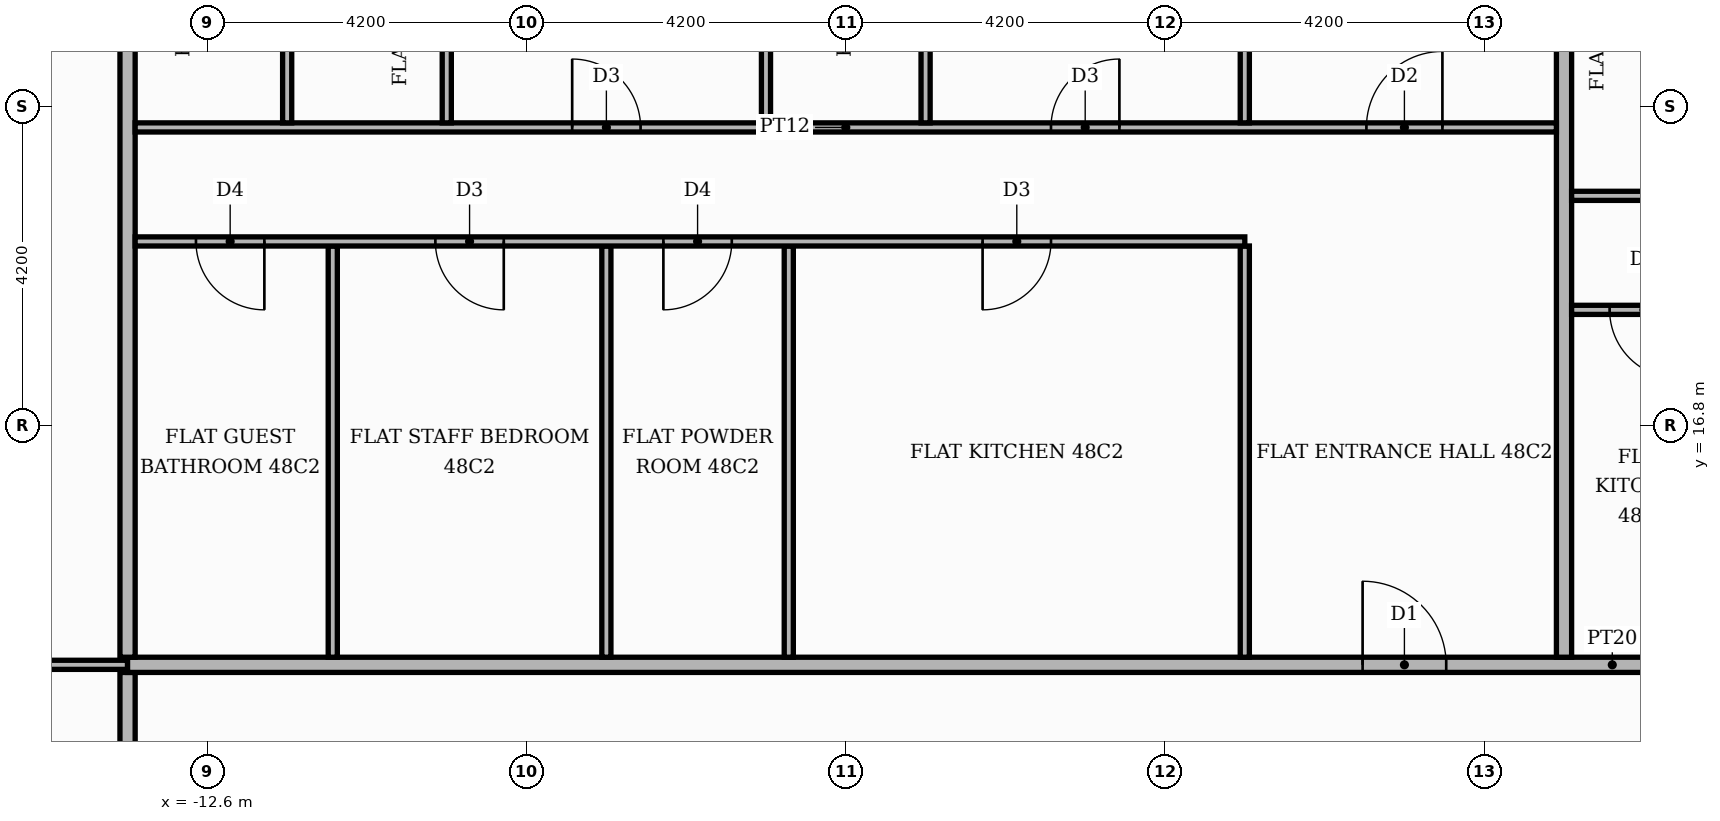
"""IFC4 building model, lengths in metres.
Left out: names, types, materials, properties, quantities, classifications, styles, units other than length and angle.
Written with IfcOpenShell. Run it as: python <this file> out.ifc"""

import sys

from ifc_helpers import new_model, si_unit, direction, frame, frame_2d, origin, place, context, subcontext, project, spatial, rectangle, extrude, element, fill, save


model = new_model("IFC4")
c1 = context("Model", 3, precision=1e-05, world=origin(), true_north=direction((0.0, 1.0)))
c2 = subcontext(c1, "Body", "Model", "MODEL_VIEW")
j1 = project(units=[si_unit("LENGTHUNIT", "METRE"), si_unit("PLANEANGLEUNIT", "RADIAN")], contexts=[c1])
p1 = place(None, origin())
s1 = spatial("IfcSite", under=j1, at=p1, CompositionType="ELEMENT")
p2 = place(p1, origin())
s2 = spatial("IfcBuilding", under=s1, at=p2, CompositionType="ELEMENT")
p3 = place(p2, frame((0.0, 0.0, 204.0)))
s3 = spatial("IfcBuildingStorey", under=s2, at=p3, CompositionType="ELEMENT", Elevation=204.0)
p4 = place(p3, frame((-13.65, -13.55, 0.0), z_axis=(0.0, 0.0, 1.0), x_axis=(0.0, 1.0, 0.0)))
e1 = element("IfcWall", 1, at=p4, inside=s3, PredefinedType="PARTITIONING", context=c2, shape_type="SweptSolid", body=[
    extrude(rectangle(XDim=27.1, YDim=0.2, at=frame_2d((13.55, 0.0))), origin(), (0.0, 0.0, 1.0), 3.48),
])
p5 = place(p4, frame((23.5, 0.0, 0.0)))
e2 = element("IfcOpeningElement", 2, at=p5, cuts=e1, PredefinedType="OPENING", context=c2, shape_type="SweptSolid", body=[
    extrude(rectangle(XDim=1.1, YDim=2.4, at=frame_2d((0.55, 1.2))), frame((0.0, 0.11, 0.0), z_axis=(0.0, -1.0, 0.0), x_axis=(1.0, 0.0, 0.0)), (0.0, 0.0, 1.0), 0.22),
])
p6 = place(p3, frame((-19.82, 13.65, 0.0), z_axis=(0.0, 0.0, 1.0), x_axis=(1.0, 0.0, 0.0)))
e3 = element("IfcWall", 3, at=p6, inside=s3, PredefinedType="PARTITIONING", context=c2, shape_type="SweptSolid", body=[
    extrude(rectangle(XDim=6.17, YDim=0.12, at=frame_2d((3.085, 0.0))), origin(), (0.0, 0.0, 1.0), 3.48),
])
p7 = place(p6, frame((2.635, 0.0, 0.0)))
e4 = element("IfcOpeningElement", 4, at=p7, cuts=e3, PredefinedType="OPENING", context=c2, shape_type="SweptSolid", body=[
    extrude(rectangle(XDim=0.9, YDim=2.1, at=frame_2d((0.45, 1.05))), frame((0.0, 0.07, 0.0), z_axis=(0.0, -1.0, 0.0), x_axis=(1.0, 0.0, 0.0)), (0.0, 0.0, 1.0), 0.14),
])
p8 = place(p3, frame((-13.65, 13.65, 0.0), z_axis=(0.0, 0.0, 1.0), x_axis=(1.0, 0.0, 0.0)))
e5 = element("IfcWall", 5, at=p8, inside=s3, PredefinedType="PARTITIONING", context=c2, shape_type="SweptSolid", body=[
    extrude(rectangle(XDim=39.07, YDim=0.2, at=frame_2d((19.535, 0.0))), origin(), (0.0, 0.0, 1.0), 3.48),
])
p9 = place(p8, frame((24.65, 0.0, 0.0)))
e6 = element("IfcOpeningElement", 6, at=p9, cuts=e5, PredefinedType="OPENING", context=c2, shape_type="SweptSolid", body=[
    extrude(rectangle(XDim=1.1, YDim=2.4, at=frame_2d((0.55, 1.2))), frame((0.0, 0.11, 0.0), z_axis=(0.0, -1.0, 0.0), x_axis=(1.0, 0.0, 0.0)), (0.0, 0.0, 1.0), 0.22),
])
p10 = place(p8, frame((16.25, 0.0, 0.0)))
e7 = element("IfcOpeningElement", 7, at=p10, cuts=e5, PredefinedType="OPENING", context=c2, shape_type="SweptSolid", body=[
    extrude(rectangle(XDim=1.1, YDim=2.4, at=frame_2d((0.55, 1.2))), frame((0.0, 0.11, 0.0), z_axis=(0.0, -1.0, 0.0), x_axis=(1.0, 0.0, 0.0)), (0.0, 0.0, 1.0), 0.22),
])
p11 = place(p3, frame((-13.65, 13.75, 0.0), z_axis=(0.0, 0.0, 1.0), x_axis=(0.0, 1.0, 0.0)))
e8 = element("IfcWall", 8, at=p11, inside=s3, PredefinedType="PARTITIONING", context=c2, shape_type="SweptSolid", body=[
    extrude(rectangle(XDim=11.67, YDim=0.2, at=frame_2d((5.835, 0.0))), origin(), (0.0, 0.0, 1.0), 3.48),
])
for number, where, z_axis, x_axis in (
    (9, (-10.95, 13.75, 0.0), (0.0, 0.0, 1.0), (0.0, 1.0, 0.0)),
    (10, (-7.35, 13.75, 0.0), (0.0, 0.0, 1.0), (0.0, 1.0, 0.0)),
    (11, (-4.95, 13.75, 0.0), (0.0, 0.0, 1.0), (0.0, 1.0, 0.0)),
    (12, (1.05, 13.75, 0.0), (0.0, 0.0, 1.0), (0.0, 1.0, 0.0)),
):
    element("IfcWall", number, at=place(p3, frame(where, z_axis=z_axis, x_axis=x_axis)), inside=s3, PredefinedType="PARTITIONING", context=c2, shape_type="SweptSolid", body=[
        extrude(rectangle(XDim=5.41, YDim=0.12, at=frame_2d((2.705, 0.0))), origin(), (0.0, 0.0, 1.0), 3.48),
    ])
p12 = place(p3, frame((5.25, 13.75, 0.0), z_axis=(0.0, 0.0, 1.0), x_axis=(0.0, 1.0, 0.0)))
e13 = element("IfcWall", 13, at=p12, inside=s3, PredefinedType="PARTITIONING", context=c2, shape_type="SweptSolid", body=[
    extrude(rectangle(XDim=11.67, YDim=0.2, at=frame_2d((5.835, 0.0))), origin(), (0.0, 0.0, 1.0), 3.48),
])
p13 = place(p3, frame((5.35, 18.32, 0.0), z_axis=(0.0, 0.0, 1.0), x_axis=(1.0, 0.0, 0.0)))
e14 = element("IfcWall", 14, at=p13, inside=s3, PredefinedType="PARTITIONING", context=c2, shape_type="SweptSolid", body=[
    extrude(rectangle(XDim=4.1, YDim=0.12, at=frame_2d((2.05, 0.0))), origin(), (0.0, 0.0, 1.0), 3.48),
])
p14 = place(p13, frame((0.5, 0.0, 0.0)))
e15 = element("IfcOpeningElement", 15, at=p14, cuts=e14, PredefinedType="OPENING", context=c2, shape_type="SweptSolid", body=[
    extrude(rectangle(XDim=0.9, YDim=2.1, at=frame_2d((0.45, 1.05))), frame((0.0, 0.07, 0.0), z_axis=(0.0, -1.0, 0.0), x_axis=(1.0, 0.0, 0.0)), (0.0, 0.0, 1.0), 0.14),
])
p15 = place(p3, frame((-13.55, 19.22, 0.0), z_axis=(0.0, 0.0, 1.0), x_axis=(1.0, 0.0, 0.0)))
e16 = element("IfcWall", 16, at=p15, inside=s3, PredefinedType="PARTITIONING", context=c2, shape_type="SweptSolid", body=[
    extrude(rectangle(XDim=14.6, YDim=0.12, at=frame_2d((7.3, 0.0))), origin(), (0.0, 0.0, 1.0), 3.48),
])
p16 = place(p15, frame((11.15, 0.0, 0.0)))
e17 = element("IfcOpeningElement", 17, at=p16, cuts=e16, PredefinedType="OPENING", context=c2, shape_type="SweptSolid", body=[
    extrude(rectangle(XDim=0.9, YDim=2.1, at=frame_2d((0.45, 1.05))), frame((0.0, 0.07, 0.0), z_axis=(0.0, -1.0, 0.0), x_axis=(1.0, 0.0, 0.0)), (0.0, 0.0, 1.0), 0.14),
])
p17 = place(p15, frame((6.95, 0.0, 0.0)))
e18 = element("IfcOpeningElement", 18, at=p17, cuts=e16, PredefinedType="OPENING", context=c2, shape_type="SweptSolid", body=[
    extrude(rectangle(XDim=0.9, YDim=2.1, at=frame_2d((0.45, 1.05))), frame((0.0, 0.07, 0.0), z_axis=(0.0, -1.0, 0.0), x_axis=(1.0, 0.0, 0.0)), (0.0, 0.0, 1.0), 0.14),
])
p18 = place(p15, frame((3.95, 0.0, 0.0)))
e19 = element("IfcOpeningElement", 19, at=p18, cuts=e16, PredefinedType="OPENING", context=c2, shape_type="SweptSolid", body=[
    extrude(rectangle(XDim=0.9, YDim=2.1, at=frame_2d((0.45, 1.05))), frame((0.0, 0.07, 0.0), z_axis=(0.0, -1.0, 0.0), x_axis=(1.0, 0.0, 0.0)), (0.0, 0.0, 1.0), 0.14),
])
p19 = place(p15, frame((0.8, 0.0, 0.0)))
e20 = element("IfcOpeningElement", 20, at=p19, cuts=e16, PredefinedType="OPENING", context=c2, shape_type="SweptSolid", body=[
    extrude(rectangle(XDim=0.9, YDim=2.1, at=frame_2d((0.45, 1.05))), frame((0.0, 0.07, 0.0), z_axis=(0.0, -1.0, 0.0), x_axis=(1.0, 0.0, 0.0)), (0.0, 0.0, 1.0), 0.14),
])
p20 = place(p3, frame((5.35, 19.82, 0.0), z_axis=(0.0, 0.0, 1.0), x_axis=(1.0, 0.0, 0.0)))
e21 = element("IfcWall", 21, at=p20, inside=s3, PredefinedType="PARTITIONING", context=c2, shape_type="SweptSolid", body=[
    extrude(rectangle(XDim=12.25, YDim=0.12, at=frame_2d((6.125, 0.0))), origin(), (0.0, 0.0, 1.0), 3.48),
])
p21 = place(p20, frame((8.85, 0.0, 0.0)))
e22 = element("IfcOpeningElement", 22, at=p21, cuts=e21, PredefinedType="OPENING", context=c2, shape_type="SweptSolid", body=[
    extrude(rectangle(XDim=1.0, YDim=2.1, at=frame_2d((0.5, 1.05))), frame((0.0, 0.07, 0.0), z_axis=(0.0, -1.0, 0.0), x_axis=(1.0, 0.0, 0.0)), (0.0, 0.0, 1.0), 0.14),
])
p22 = place(p20, frame((5.75, 0.0, 0.0)))
e23 = element("IfcOpeningElement", 23, at=p22, cuts=e21, PredefinedType="OPENING", context=c2, shape_type="SweptSolid", body=[
    extrude(rectangle(XDim=0.9, YDim=2.1, at=frame_2d((0.45, 1.05))), frame((0.0, 0.07, 0.0), z_axis=(0.0, -1.0, 0.0), x_axis=(1.0, 0.0, 0.0)), (0.0, 0.0, 1.0), 0.14),
])
p23 = place(p3, frame((-13.55, 20.72, 0.0), z_axis=(0.0, 0.0, 1.0), x_axis=(1.0, 0.0, 0.0)))
e24 = element("IfcWall", 24, at=p23, inside=s3, PredefinedType="PARTITIONING", context=c2, shape_type="SweptSolid", body=[
    extrude(rectangle(XDim=18.7, YDim=0.12, at=frame_2d((9.35, 0.0))), origin(), (0.0, 0.0, 1.0), 3.48),
])
p24 = place(p23, frame((16.2, 0.0, 0.0)))
e25 = element("IfcOpeningElement", 25, at=p24, cuts=e24, PredefinedType="OPENING", context=c2, shape_type="SweptSolid", body=[
    extrude(rectangle(XDim=1.0, YDim=2.1, at=frame_2d((0.5, 1.05))), frame((0.0, 0.07, 0.0), z_axis=(0.0, -1.0, 0.0), x_axis=(1.0, 0.0, 0.0)), (0.0, 0.0, 1.0), 0.14),
])
p25 = place(p23, frame((12.05, 0.0, 0.0)))
e26 = element("IfcOpeningElement", 26, at=p25, cuts=e24, PredefinedType="OPENING", context=c2, shape_type="SweptSolid", body=[
    extrude(rectangle(XDim=0.9, YDim=2.1, at=frame_2d((0.45, 1.05))), frame((0.0, 0.07, 0.0), z_axis=(0.0, -1.0, 0.0), x_axis=(1.0, 0.0, 0.0)), (0.0, 0.0, 1.0), 0.14),
])
p26 = place(p23, frame((5.75, 0.0, 0.0)))
e27 = element("IfcOpeningElement", 27, at=p26, cuts=e24, PredefinedType="OPENING", context=c2, shape_type="SweptSolid", body=[
    extrude(rectangle(XDim=0.9, YDim=2.1, at=frame_2d((0.45, 1.05))), frame((0.0, 0.07, 0.0), z_axis=(0.0, -1.0, 0.0), x_axis=(1.0, 0.0, 0.0)), (0.0, 0.0, 1.0), 0.14),
])
p27 = place(p3, frame((-11.55, 20.78, 0.0), z_axis=(0.0, 0.0, 1.0), x_axis=(0.0, 1.0, 0.0)))
e28 = element("IfcWall", 28, at=p27, inside=s3, PredefinedType="PARTITIONING", context=c2, shape_type="SweptSolid", body=[
    extrude(rectangle(XDim=4.64, YDim=0.12, at=frame_2d((2.32, 0.0))), origin(), (0.0, 0.0, 1.0), 3.48),
])
p28 = place(p27, frame((1.99, 0.0, 0.0)))
e29 = element("IfcOpeningElement", 29, at=p28, cuts=e28, PredefinedType="OPENING", context=c2, shape_type="SweptSolid", body=[
    extrude(rectangle(XDim=0.9, YDim=2.1, at=frame_2d((0.45, 1.05))), frame((0.0, 0.07, 0.0), z_axis=(0.0, -1.0, 0.0), x_axis=(1.0, 0.0, 0.0)), (0.0, 0.0, 1.0), 0.14),
])
p29 = place(p3, frame((-9.45, 20.78, 0.0), z_axis=(0.0, 0.0, 1.0), x_axis=(0.0, 1.0, 0.0)))
e30 = element("IfcWall", 30, at=p29, inside=s3, PredefinedType="PARTITIONING", context=c2, shape_type="SweptSolid", body=[
    extrude(rectangle(XDim=4.64, YDim=0.12, at=frame_2d((2.32, 0.0))), origin(), (0.0, 0.0, 1.0), 3.48),
])
p30 = place(p29, frame((1.99, 0.0, 0.0)))
e31 = element("IfcOpeningElement", 31, at=p30, cuts=e30, PredefinedType="OPENING", context=c2, shape_type="SweptSolid", body=[
    extrude(rectangle(XDim=0.9, YDim=2.1, at=frame_2d((0.45, 1.05))), frame((0.0, 0.07, 0.0), z_axis=(0.0, -1.0, 0.0), x_axis=(1.0, 0.0, 0.0)), (0.0, 0.0, 1.0), 0.14),
])
p31 = place(p3, frame((-5.25, 20.78, 0.0), z_axis=(0.0, 0.0, 1.0), x_axis=(0.0, 1.0, 0.0)))
e32 = element("IfcWall", 32, at=p31, inside=s3, PredefinedType="PARTITIONING", context=c2, shape_type="SweptSolid", body=[
    extrude(rectangle(XDim=4.64, YDim=0.12, at=frame_2d((2.32, 0.0))), origin(), (0.0, 0.0, 1.0), 3.48),
])
p32 = place(p3, frame((-3.15, 20.78, 0.0), z_axis=(0.0, 0.0, 1.0), x_axis=(0.0, 1.0, 0.0)))
e33 = element("IfcWall", 33, at=p32, inside=s3, PredefinedType="PARTITIONING", context=c2, shape_type="SweptSolid", body=[
    extrude(rectangle(XDim=4.64, YDim=0.12, at=frame_2d((2.32, 0.0))), origin(), (0.0, 0.0, 1.0), 3.48),
])
p33 = place(p32, frame((1.99, 0.0, 0.0)))
e34 = element("IfcOpeningElement", 34, at=p33, cuts=e33, PredefinedType="OPENING", context=c2, shape_type="SweptSolid", body=[
    extrude(rectangle(XDim=0.9, YDim=2.1, at=frame_2d((0.45, 1.05))), frame((0.0, 0.07, 0.0), z_axis=(0.0, -1.0, 0.0), x_axis=(1.0, 0.0, 0.0)), (0.0, 0.0, 1.0), 0.14),
])
p34 = place(p3, frame((1.05, 20.78, 0.0), z_axis=(0.0, 0.0, 1.0), x_axis=(0.0, 1.0, 0.0)))
e35 = element("IfcWall", 35, at=p34, inside=s3, PredefinedType="PARTITIONING", context=c2, shape_type="SweptSolid", body=[
    extrude(rectangle(XDim=4.64, YDim=0.12, at=frame_2d((2.32, 0.0))), origin(), (0.0, 0.0, 1.0), 3.48),
])
p35 = place(p14, frame((0.9, 0.0, 0.0), z_axis=(0.0, 0.0, 1.0), x_axis=(-1.0, 0.0, 0.0)))
e36 = element("IfcDoor", 36, at=p35, inside=s3, OperationType="SINGLE_SWING_RIGHT", PredefinedType="DOOR", context=c2, shape_type="SweptSolid", body=[
    extrude(rectangle(XDim=0.9, YDim=2.1, at=frame_2d((0.45, 1.05))), frame((0.0, 0.025, 0.0), z_axis=(0.0, -1.0, 0.0), x_axis=(1.0, 0.0, 0.0)), (0.0, 0.0, 1.0), 0.05),
])
fill(e15, e36)
p36 = place(p10, origin())
e37 = element("IfcDoor", 37, at=p36, inside=s3, OperationType="SINGLE_SWING_LEFT", PredefinedType="DOOR", context=c2, shape_type="SweptSolid", body=[
    extrude(rectangle(XDim=1.1, YDim=2.4, at=frame_2d((0.55, 1.2))), frame((0.0, 0.025, 0.0), z_axis=(0.0, -1.0, 0.0), x_axis=(1.0, 0.0, 0.0)), (0.0, 0.0, 1.0), 0.05),
])
fill(e7, e37)
p37 = place(p16, frame((0.9, 0.0, 0.0), z_axis=(0.0, 0.0, 1.0), x_axis=(-1.0, 0.0, 0.0)))
e38 = element("IfcDoor", 38, at=p37, inside=s3, OperationType="SINGLE_SWING_LEFT", PredefinedType="DOOR", context=c2, shape_type="SweptSolid", body=[
    extrude(rectangle(XDim=0.9, YDim=2.1, at=frame_2d((0.45, 1.05))), frame((0.0, 0.025, 0.0), z_axis=(0.0, -1.0, 0.0), x_axis=(1.0, 0.0, 0.0)), (0.0, 0.0, 1.0), 0.05),
])
fill(e17, e38)
p38 = place(p17, frame((0.9, 0.0, 0.0), z_axis=(0.0, 0.0, 1.0), x_axis=(-1.0, 0.0, 0.0)))
e39 = element("IfcDoor", 39, at=p38, inside=s3, OperationType="SINGLE_SWING_LEFT", PredefinedType="DOOR", context=c2, shape_type="SweptSolid", body=[
    extrude(rectangle(XDim=0.9, YDim=2.1, at=frame_2d((0.45, 1.05))), frame((0.0, 0.025, 0.0), z_axis=(0.0, -1.0, 0.0), x_axis=(1.0, 0.0, 0.0)), (0.0, 0.0, 1.0), 0.05),
])
fill(e18, e39)
p39 = place(p18, frame((0.9, 0.0, 0.0), z_axis=(0.0, 0.0, 1.0), x_axis=(-1.0, 0.0, 0.0)))
e40 = element("IfcDoor", 40, at=p39, inside=s3, OperationType="SINGLE_SWING_RIGHT", PredefinedType="DOOR", context=c2, shape_type="SweptSolid", body=[
    extrude(rectangle(XDim=0.9, YDim=2.1, at=frame_2d((0.45, 1.05))), frame((0.0, 0.025, 0.0), z_axis=(0.0, -1.0, 0.0), x_axis=(1.0, 0.0, 0.0)), (0.0, 0.0, 1.0), 0.05),
])
fill(e19, e40)
p40 = place(p19, frame((0.9, 0.0, 0.0), z_axis=(0.0, 0.0, 1.0), x_axis=(-1.0, 0.0, 0.0)))
e41 = element("IfcDoor", 41, at=p40, inside=s3, OperationType="SINGLE_SWING_RIGHT", PredefinedType="DOOR", context=c2, shape_type="SweptSolid", body=[
    extrude(rectangle(XDim=0.9, YDim=2.1, at=frame_2d((0.45, 1.05))), frame((0.0, 0.025, 0.0), z_axis=(0.0, -1.0, 0.0), x_axis=(1.0, 0.0, 0.0)), (0.0, 0.0, 1.0), 0.05),
])
fill(e20, e41)
p41 = place(p24, origin())
e42 = element("IfcDoor", 42, at=p41, inside=s3, OperationType="SINGLE_SWING_RIGHT", PredefinedType="DOOR", context=c2, shape_type="SweptSolid", body=[
    extrude(rectangle(XDim=1.0, YDim=2.1, at=frame_2d((0.5, 1.05))), frame((0.0, 0.025, 0.0), z_axis=(0.0, -1.0, 0.0), x_axis=(1.0, 0.0, 0.0)), (0.0, 0.0, 1.0), 0.05),
])
fill(e25, e42)
p42 = place(p25, origin())
e43 = element("IfcDoor", 43, at=p42, inside=s3, OperationType="SINGLE_SWING_RIGHT", PredefinedType="DOOR", context=c2, shape_type="SweptSolid", body=[
    extrude(rectangle(XDim=0.9, YDim=2.1, at=frame_2d((0.45, 1.05))), frame((0.0, 0.025, 0.0), z_axis=(0.0, -1.0, 0.0), x_axis=(1.0, 0.0, 0.0)), (0.0, 0.0, 1.0), 0.05),
])
fill(e26, e43)
p43 = place(p26, origin())
e44 = element("IfcDoor", 44, at=p43, inside=s3, OperationType="SINGLE_SWING_LEFT", PredefinedType="DOOR", context=c2, shape_type="SweptSolid", body=[
    extrude(rectangle(XDim=0.9, YDim=2.1, at=frame_2d((0.45, 1.05))), frame((0.0, 0.025, 0.0), z_axis=(0.0, -1.0, 0.0), x_axis=(1.0, 0.0, 0.0)), (0.0, 0.0, 1.0), 0.05),
])
fill(e27, e44)
save(model, sys.argv[1])
